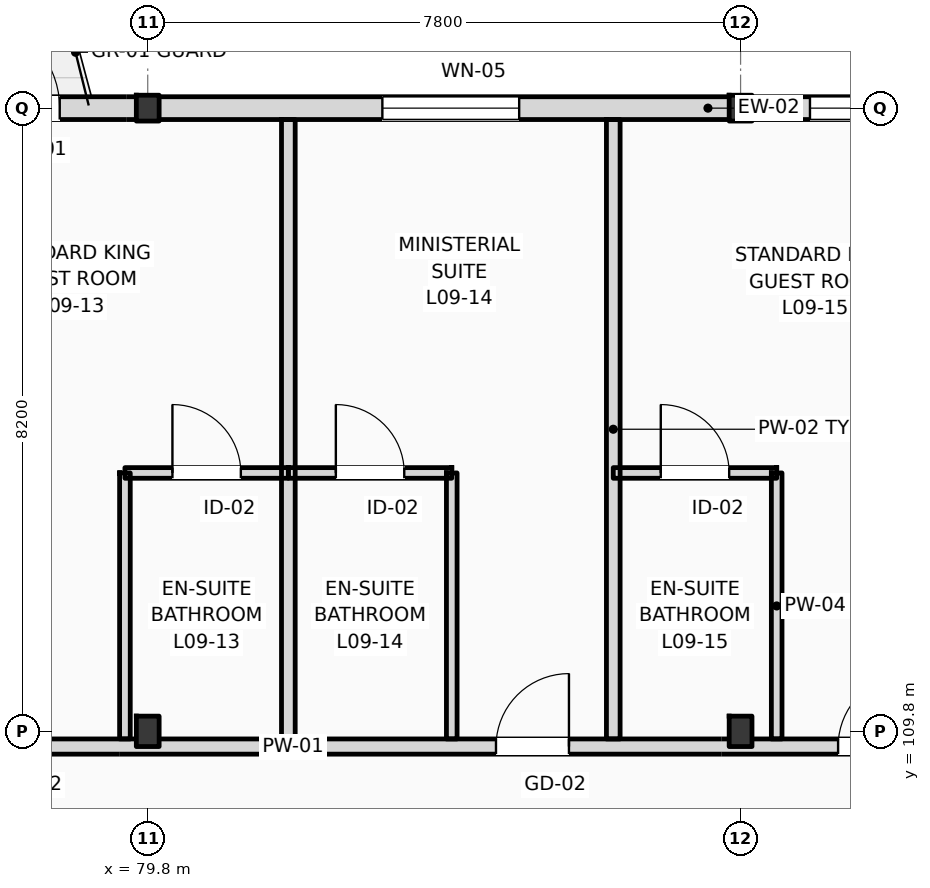
"""IFC4 building model, lengths in metres.
Left out: names, types, materials, properties, quantities, classifications, styles, units other than length and angle.
Written with IfcOpenShell. Run it as: python <this file> out.ifc"""

import sys

from ifc_helpers import new_model, si_unit, direction, frame, frame_2d, origin, origin_2d, place, context, subcontext, project, spatial, rectangle, i_section, extrude, element, fill, save


model = new_model("IFC4")
c1 = context("Model", 3, precision=1e-05, world=origin(), true_north=direction((0.0, 1.0)))
c2 = subcontext(c1, "Body", "Model", "MODEL_VIEW")
j1 = project(units=[si_unit("LENGTHUNIT", "METRE"), si_unit("PLANEANGLEUNIT", "RADIAN")], contexts=[c1])
p1 = place(None, origin())
s1 = spatial("IfcSite", under=j1, at=p1, CompositionType="ELEMENT")
p2 = place(p1, origin())
s2 = spatial("IfcBuilding", under=s1, at=p2, CompositionType="ELEMENT")
p3 = place(p2, frame((0.0, 0.0, 39.0)))
s3 = spatial("IfcBuildingStorey", under=s2, at=p3, CompositionType="ELEMENT", Elevation=39.0)
p4 = place(p3, frame((79.8, 109.8, 0.0), z_axis=(0.0, 0.0, 1.0), x_axis=(1.0, 0.0, 0.0)))
e1 = element("IfcColumn", 1, at=p4, inside=s3, PredefinedType="COLUMN", context=c2, shape_type="SweptSolid", body=[
    extrude(i_section(OverallWidth=0.3, OverallDepth=0.4, WebThickness=0.013, FlangeThickness=0.024, FilletRadius=0.027, at=origin_2d()), origin(), (0.0, 0.0, 1.0), 3.6),
])
p5 = place(p3, frame((79.8, 118.0, 0.0), z_axis=(0.0, 0.0, 1.0), x_axis=(1.0, 0.0, 0.0)))
e2 = element("IfcColumn", 2, at=p5, inside=s3, PredefinedType="COLUMN", context=c2, shape_type="SweptSolid", body=[
    extrude(i_section(OverallWidth=0.3, OverallDepth=0.34, WebThickness=0.012, FlangeThickness=0.021, FilletRadius=0.027, at=origin_2d()), origin(), (0.0, 0.0, 1.0), 3.6),
])
p6 = place(p3, frame((87.6, 109.8, 0.0), z_axis=(0.0, 0.0, 1.0), x_axis=(1.0, 0.0, 0.0)))
e3 = element("IfcColumn", 3, at=p6, inside=s3, PredefinedType="COLUMN", context=c2, shape_type="SweptSolid", body=[
    extrude(i_section(OverallWidth=0.3, OverallDepth=0.4, WebThickness=0.013, FlangeThickness=0.024, FilletRadius=0.027, at=origin_2d()), origin(), (0.0, 0.0, 1.0), 3.6),
])
p7 = place(p3, frame((87.6, 118.0, 0.0), z_axis=(0.0, 0.0, 1.0), x_axis=(1.0, 0.0, 0.0)))
e4 = element("IfcColumn", 4, at=p7, inside=s3, PredefinedType="COLUMN", context=c2, shape_type="SweptSolid", body=[
    extrude(i_section(OverallWidth=0.3, OverallDepth=0.34, WebThickness=0.012, FlangeThickness=0.021, FilletRadius=0.027, at=origin_2d()), origin(), (0.0, 0.0, 1.0), 3.6),
])
p8 = place(p3, frame((22.5, 118.0, 0.0), z_axis=(0.0, 0.0, 1.0), x_axis=(1.0, 0.0, 0.0)))
e5 = element("IfcWall", 5, at=p8, inside=s3, PredefinedType="STANDARD", context=c2, shape_type="SweptSolid", body=[
    extrude(rectangle(XDim=72.9, YDim=0.3, at=frame_2d((36.45, 0.0))), origin(), (0.0, 0.0, 1.0), 2.92),
])
p9 = place(p8, frame((3.6, 0.0, 0.9)))
e6 = element("IfcOpeningElement", 6, at=p9, cuts=e5, PredefinedType="OPENING", context=c2, shape_type="SweptSolid", body=[
    extrude(rectangle(XDim=1.1, YDim=1.6, at=frame_2d((0.55, 0.8))), frame((0.0, 0.16, 0.0), z_axis=(0.0, -1.0, 0.0), x_axis=(1.0, 0.0, 0.0)), (0.0, 0.0, 1.0), 0.32),
])
p10 = place(p8, frame((6.688, 0.0, 0.0)))
e7 = element("IfcOpeningElement", 7, at=p10, cuts=e5, PredefinedType="OPENING", context=c2, shape_type="SweptSolid", body=[
    extrude(rectangle(XDim=1.2, YDim=2.25, at=frame_2d((0.6, 1.125))), frame((0.0, 0.16, 0.0), z_axis=(0.0, -1.0, 0.0), x_axis=(1.0, 0.0, 0.0)), (0.0, 0.0, 1.0), 0.32),
])
p11 = place(p8, frame((11.388, 0.0, 0.9)))
e8 = element("IfcOpeningElement", 8, at=p11, cuts=e5, PredefinedType="OPENING", context=c2, shape_type="SweptSolid", body=[
    extrude(rectangle(XDim=1.6, YDim=1.75, at=frame_2d((0.8, 0.875))), frame((0.0, 0.16, 0.0), z_axis=(0.0, -1.0, 0.0), x_axis=(1.0, 0.0, 0.0)), (0.0, 0.0, 1.0), 0.32),
])
p12 = place(p8, frame((15.413, 0.0, 0.9)))
e9 = element("IfcOpeningElement", 9, at=p12, cuts=e5, PredefinedType="OPENING", context=c2, shape_type="SweptSolid", body=[
    extrude(rectangle(XDim=1.75, YDim=1.84, at=frame_2d((0.875, 0.92))), frame((0.0, 0.16, 0.0), z_axis=(0.0, -1.0, 0.0), x_axis=(1.0, 0.0, 0.0)), (0.0, 0.0, 1.0), 0.32),
])
p13 = place(p8, frame((21.245, 0.0, 0.0)))
e10 = element("IfcOpeningElement", 10, at=p13, cuts=e5, PredefinedType="OPENING", context=c2, shape_type="SweptSolid", body=[
    extrude(rectangle(XDim=1.2, YDim=2.25, at=frame_2d((0.6, 1.125))), frame((0.0, 0.16, 0.0), z_axis=(0.0, -1.0, 0.0), x_axis=(1.0, 0.0, 0.0)), (0.0, 0.0, 1.0), 0.32),
])
p14 = place(p8, frame((23.705, 0.0, 0.0)))
e11 = element("IfcOpeningElement", 11, at=p14, cuts=e5, PredefinedType="OPENING", context=c2, shape_type="SweptSolid", body=[
    extrude(rectangle(XDim=1.2, YDim=2.25, at=frame_2d((0.6, 1.125))), frame((0.0, 0.16, 0.0), z_axis=(0.0, -1.0, 0.0), x_axis=(1.0, 0.0, 0.0)), (0.0, 0.0, 1.0), 0.32),
])
p15 = place(p8, frame((28.488, 0.0, 0.9)))
e12 = element("IfcOpeningElement", 12, at=p15, cuts=e5, PredefinedType="OPENING", context=c2, shape_type="SweptSolid", body=[
    extrude(rectangle(XDim=2.6, YDim=1.84, at=frame_2d((1.3, 0.92))), frame((0.0, 0.16, 0.0), z_axis=(0.0, -1.0, 0.0), x_axis=(1.0, 0.0, 0.0)), (0.0, 0.0, 1.0), 0.32),
])
p16 = place(p8, frame((34.76, 0.0, 0.9)))
e13 = element("IfcOpeningElement", 13, at=p16, cuts=e5, PredefinedType="OPENING", context=c2, shape_type="SweptSolid", body=[
    extrude(rectangle(XDim=1.1, YDim=1.84, at=frame_2d((0.55, 0.92))), frame((0.0, 0.16, 0.0), z_axis=(0.0, -1.0, 0.0), x_axis=(1.0, 0.0, 0.0)), (0.0, 0.0, 1.0), 0.32),
])
p17 = place(p8, frame((38.143, 0.0, 0.0)))
e14 = element("IfcOpeningElement", 14, at=p17, cuts=e5, PredefinedType="OPENING", context=c2, shape_type="SweptSolid", body=[
    extrude(rectangle(XDim=1.2, YDim=2.25, at=frame_2d((0.6, 1.125))), frame((0.0, 0.16, 0.0), z_axis=(0.0, -1.0, 0.0), x_axis=(1.0, 0.0, 0.0)), (0.0, 0.0, 1.0), 0.32),
])
p18 = place(p8, frame((42.687, 0.0, 0.9)))
e15 = element("IfcOpeningElement", 15, at=p18, cuts=e5, PredefinedType="OPENING", context=c2, shape_type="SweptSolid", body=[
    extrude(rectangle(XDim=1.2, YDim=1.8, at=frame_2d((0.6, 0.9))), frame((0.0, 0.16, 0.0), z_axis=(0.0, -1.0, 0.0), x_axis=(1.0, 0.0, 0.0)), (0.0, 0.0, 1.0), 0.32),
])
p19 = place(p8, frame((47.112, 0.0, 0.9)))
e16 = element("IfcOpeningElement", 16, at=p19, cuts=e5, PredefinedType="OPENING", context=c2, shape_type="SweptSolid", body=[
    extrude(rectangle(XDim=1.35, YDim=1.84, at=frame_2d((0.675, 0.92))), frame((0.0, 0.16, 0.0), z_axis=(0.0, -1.0, 0.0), x_axis=(1.0, 0.0, 0.0)), (0.0, 0.0, 1.0), 0.32),
])
p20 = place(p8, frame((52.482, 0.0, 0.0)))
e17 = element("IfcOpeningElement", 17, at=p20, cuts=e5, PredefinedType="OPENING", context=c2, shape_type="SweptSolid", body=[
    extrude(rectangle(XDim=1.2, YDim=2.25, at=frame_2d((0.6, 1.125))), frame((0.0, 0.16, 0.0), z_axis=(0.0, -1.0, 0.0), x_axis=(1.0, 0.0, 0.0)), (0.0, 0.0, 1.0), 0.32),
])
p21 = place(p8, frame((54.942, 0.0, 0.0)))
e18 = element("IfcOpeningElement", 18, at=p21, cuts=e5, PredefinedType="OPENING", context=c2, shape_type="SweptSolid", body=[
    extrude(rectangle(XDim=1.2, YDim=2.25, at=frame_2d((0.6, 1.125))), frame((0.0, 0.16, 0.0), z_axis=(0.0, -1.0, 0.0), x_axis=(1.0, 0.0, 0.0)), (0.0, 0.0, 1.0), 0.32),
])
p22 = place(p8, frame((60.387, 0.0, 0.9)))
e19 = element("IfcOpeningElement", 19, at=p22, cuts=e5, PredefinedType="OPENING", context=c2, shape_type="SweptSolid", body=[
    extrude(rectangle(XDim=1.8, YDim=1.84, at=frame_2d((0.9, 0.92))), frame((0.0, 0.16, 0.0), z_axis=(0.0, -1.0, 0.0), x_axis=(1.0, 0.0, 0.0)), (0.0, 0.0, 1.0), 0.32),
])
p23 = place(p8, frame((66.013, 0.0, 0.9)))
e20 = element("IfcOpeningElement", 20, at=p23, cuts=e5, PredefinedType="OPENING", context=c2, shape_type="SweptSolid", body=[
    extrude(rectangle(XDim=1.35, YDim=1.84, at=frame_2d((0.675, 0.92))), frame((0.0, 0.16, 0.0), z_axis=(0.0, -1.0, 0.0), x_axis=(1.0, 0.0, 0.0)), (0.0, 0.0, 1.0), 0.32),
])
p24 = place(p8, frame((69.275, 0.0, 0.9)))
e21 = element("IfcOpeningElement", 21, at=p24, cuts=e5, PredefinedType="OPENING", context=c2, shape_type="SweptSolid", body=[
    extrude(rectangle(XDim=2.1, YDim=1.84, at=frame_2d((1.05, 0.92))), frame((0.0, 0.16, 0.0), z_axis=(0.0, -1.0, 0.0), x_axis=(1.0, 0.0, 0.0)), (0.0, 0.0, 1.0), 0.32),
])
p25 = place(p3, frame((10.65, 109.6, 0.0), z_axis=(0.0, 0.0, 1.0), x_axis=(1.0, 0.0, 0.0)))
e22 = element("IfcWall", 22, at=p25, inside=s3, PredefinedType="PARTITIONING", context=c2, shape_type="SweptSolid", body=[
    extrude(rectangle(XDim=84.61, YDim=0.2, at=frame_2d((42.305, 0.0))), origin(), (0.0, 0.0, 1.0), 2.82),
])
p26 = place(p25, frame((15.49, 0.0, 0.0)))
e23 = element("IfcOpeningElement", 23, at=p26, cuts=e22, PredefinedType="OPENING", context=c2, shape_type="SweptSolid", body=[
    extrude(rectangle(XDim=1.02, YDim=2.2, at=frame_2d((0.51, 1.1))), frame((0.0, 0.11, 0.0), z_axis=(0.0, -1.0, 0.0), x_axis=(1.0, 0.0, 0.0)), (0.0, 0.0, 1.0), 0.22),
])
p27 = place(p25, frame((19.703, 0.0, 0.0)))
e24 = element("IfcOpeningElement", 24, at=p27, cuts=e22, PredefinedType="OPENING", context=c2, shape_type="SweptSolid", body=[
    extrude(rectangle(XDim=1.02, YDim=2.2, at=frame_2d((0.51, 1.1))), frame((0.0, 0.11, 0.0), z_axis=(0.0, -1.0, 0.0), x_axis=(1.0, 0.0, 0.0)), (0.0, 0.0, 1.0), 0.22),
])
p28 = place(p25, frame((24.203, 0.0, 0.0)))
e25 = element("IfcOpeningElement", 25, at=p28, cuts=e22, PredefinedType="OPENING", context=c2, shape_type="SweptSolid", body=[
    extrude(rectangle(XDim=1.02, YDim=2.2, at=frame_2d((0.51, 1.1))), frame((0.0, 0.11, 0.0), z_axis=(0.0, -1.0, 0.0), x_axis=(1.0, 0.0, 0.0)), (0.0, 0.0, 1.0), 0.22),
])
p29 = place(p25, frame((26.552, 0.0, 0.0)))
e26 = element("IfcOpeningElement", 26, at=p29, cuts=e22, PredefinedType="OPENING", context=c2, shape_type="SweptSolid", body=[
    extrude(rectangle(XDim=1.02, YDim=2.2, at=frame_2d((0.51, 1.1))), frame((0.0, 0.11, 0.0), z_axis=(0.0, -1.0, 0.0), x_axis=(1.0, 0.0, 0.0)), (0.0, 0.0, 1.0), 0.22),
])
p30 = place(p25, frame((33.233, 0.0, 0.0)))
e27 = element("IfcOpeningElement", 27, at=p30, cuts=e22, PredefinedType="OPENING", context=c2, shape_type="SweptSolid", body=[
    extrude(rectangle(XDim=0.96, YDim=2.2, at=frame_2d((0.48, 1.1))), frame((0.0, 0.11, 0.0), z_axis=(0.0, -1.0, 0.0), x_axis=(1.0, 0.0, 0.0)), (0.0, 0.0, 1.0), 0.22),
])
p31 = place(p25, frame((35.583, 0.0, 0.0)))
e28 = element("IfcOpeningElement", 28, at=p31, cuts=e22, PredefinedType="OPENING", context=c2, shape_type="SweptSolid", body=[
    extrude(rectangle(XDim=0.96, YDim=2.2, at=frame_2d((0.48, 1.1))), frame((0.0, 0.11, 0.0), z_axis=(0.0, -1.0, 0.0), x_axis=(1.0, 0.0, 0.0)), (0.0, 0.0, 1.0), 0.22),
])
p32 = place(p25, frame((42.233, 0.0, 0.0)))
e29 = element("IfcOpeningElement", 29, at=p32, cuts=e22, PredefinedType="OPENING", context=c2, shape_type="SweptSolid", body=[
    extrude(rectangle(XDim=0.96, YDim=2.2, at=frame_2d((0.48, 1.1))), frame((0.0, 0.11, 0.0), z_axis=(0.0, -1.0, 0.0), x_axis=(1.0, 0.0, 0.0)), (0.0, 0.0, 1.0), 0.22),
])
p33 = place(p25, frame((46.983, 0.0, 0.0)))
e30 = element("IfcOpeningElement", 30, at=p33, cuts=e22, PredefinedType="OPENING", context=c2, shape_type="SweptSolid", body=[
    extrude(rectangle(XDim=0.96, YDim=2.2, at=frame_2d((0.48, 1.1))), frame((0.0, 0.11, 0.0), z_axis=(0.0, -1.0, 0.0), x_axis=(1.0, 0.0, 0.0)), (0.0, 0.0, 1.0), 0.22),
])
p34 = place(p25, frame((51.233, 0.0, 0.0)))
e31 = element("IfcOpeningElement", 31, at=p34, cuts=e22, PredefinedType="OPENING", context=c2, shape_type="SweptSolid", body=[
    extrude(rectangle(XDim=0.96, YDim=2.2, at=frame_2d((0.48, 1.1))), frame((0.0, 0.11, 0.0), z_axis=(0.0, -1.0, 0.0), x_axis=(1.0, 0.0, 0.0)), (0.0, 0.0, 1.0), 0.22),
])
p35 = place(p25, frame((55.733, 0.0, 0.0)))
e32 = element("IfcOpeningElement", 32, at=p35, cuts=e22, PredefinedType="OPENING", context=c2, shape_type="SweptSolid", body=[
    extrude(rectangle(XDim=0.96, YDim=2.2, at=frame_2d((0.48, 1.1))), frame((0.0, 0.11, 0.0), z_axis=(0.0, -1.0, 0.0), x_axis=(1.0, 0.0, 0.0)), (0.0, 0.0, 1.0), 0.22),
])
p36 = place(p25, frame((58.083, 0.0, 0.0)))
e33 = element("IfcOpeningElement", 33, at=p36, cuts=e22, PredefinedType="OPENING", context=c2, shape_type="SweptSolid", body=[
    extrude(rectangle(XDim=0.96, YDim=2.2, at=frame_2d((0.48, 1.1))), frame((0.0, 0.11, 0.0), z_axis=(0.0, -1.0, 0.0), x_axis=(1.0, 0.0, 0.0)), (0.0, 0.0, 1.0), 0.22),
])
p37 = place(p25, frame((64.732, 0.0, 0.0)))
e34 = element("IfcOpeningElement", 34, at=p37, cuts=e22, PredefinedType="OPENING", context=c2, shape_type="SweptSolid", body=[
    extrude(rectangle(XDim=0.96, YDim=2.2, at=frame_2d((0.48, 1.1))), frame((0.0, 0.11, 0.0), z_axis=(0.0, -1.0, 0.0), x_axis=(1.0, 0.0, 0.0)), (0.0, 0.0, 1.0), 0.22),
])
p38 = place(p25, frame((66.832, 0.0, 0.0)))
e35 = element("IfcOpeningElement", 35, at=p38, cuts=e22, PredefinedType="OPENING", context=c2, shape_type="SweptSolid", body=[
    extrude(rectangle(XDim=0.96, YDim=2.2, at=frame_2d((0.48, 1.1))), frame((0.0, 0.11, 0.0), z_axis=(0.0, -1.0, 0.0), x_axis=(1.0, 0.0, 0.0)), (0.0, 0.0, 1.0), 0.22),
])
p39 = place(p25, frame((73.732, 0.0, 0.0)))
e36 = element("IfcOpeningElement", 36, at=p39, cuts=e22, PredefinedType="OPENING", context=c2, shape_type="SweptSolid", body=[
    extrude(rectangle(XDim=0.96, YDim=2.2, at=frame_2d((0.48, 1.1))), frame((0.0, 0.11, 0.0), z_axis=(0.0, -1.0, 0.0), x_axis=(1.0, 0.0, 0.0)), (0.0, 0.0, 1.0), 0.22),
])
p40 = place(p25, frame((78.233, 0.0, 0.0)))
e37 = element("IfcOpeningElement", 37, at=p40, cuts=e22, PredefinedType="OPENING", context=c2, shape_type="SweptSolid", body=[
    extrude(rectangle(XDim=0.96, YDim=2.2, at=frame_2d((0.48, 1.1))), frame((0.0, 0.11, 0.0), z_axis=(0.0, -1.0, 0.0), x_axis=(1.0, 0.0, 0.0)), (0.0, 0.0, 1.0), 0.22),
])
p41 = place(p25, frame((80.62, 0.0, 0.0)))
e38 = element("IfcOpeningElement", 38, at=p41, cuts=e22, PredefinedType="OPENING", context=c2, shape_type="SweptSolid", body=[
    extrude(rectangle(XDim=0.96, YDim=2.2, at=frame_2d((0.48, 1.1))), frame((0.0, 0.11, 0.0), z_axis=(0.0, -1.0, 0.0), x_axis=(1.0, 0.0, 0.0)), (0.0, 0.0, 1.0), 0.22),
])
p42 = place(p25, frame((2.716, 0.0, 0.0)))
e39 = element("IfcOpeningElement", 39, at=p42, cuts=e22, PredefinedType="OPENING", context=c2, shape_type="SweptSolid", body=[
    extrude(rectangle(XDim=1.35, YDim=2.25, at=frame_2d((0.675, 1.125))), frame((0.0, 0.11, 0.0), z_axis=(0.0, -1.0, 0.0), x_axis=(1.0, 0.0, 0.0)), (0.0, 0.0, 1.0), 0.22),
])
p43 = place(p25, frame((6.65, 0.0, 0.0)))
e40 = element("IfcOpeningElement", 40, at=p43, cuts=e22, PredefinedType="OPENING", context=c2, shape_type="SweptSolid", body=[
    extrude(rectangle(XDim=1.35, YDim=2.25, at=frame_2d((0.675, 1.125))), frame((0.0, 0.11, 0.0), z_axis=(0.0, -1.0, 0.0), x_axis=(1.0, 0.0, 0.0)), (0.0, 0.0, 1.0), 0.22),
])
p44 = place(p25, frame((10.583, 0.0, 0.0)))
e41 = element("IfcOpeningElement", 41, at=p44, cuts=e22, PredefinedType="OPENING", context=c2, shape_type="SweptSolid", body=[
    extrude(rectangle(XDim=1.35, YDim=2.25, at=frame_2d((0.675, 1.125))), frame((0.0, 0.11, 0.0), z_axis=(0.0, -1.0, 0.0), x_axis=(1.0, 0.0, 0.0)), (0.0, 0.0, 1.0), 0.22),
])
p45 = place(p3, frame((81.65, 109.7, 0.0), z_axis=(0.0, 0.0, 1.0), x_axis=(0.0, 1.0, 0.0)))
e42 = element("IfcWall", 42, at=p45, inside=s3, PredefinedType="PARTITIONING", context=c2, shape_type="SweptSolid", body=[
    extrude(rectangle(XDim=8.15, YDim=0.18, at=frame_2d((4.075, 0.0))), origin(), (0.0, 0.0, 1.0), 3.38),
])
p46 = place(p3, frame((79.5, 109.7, 0.0), z_axis=(0.0, 0.0, 1.0), x_axis=(0.0, 1.0, 0.0)))
e43 = element("IfcWall", 43, at=p46, inside=s3, PredefinedType="PARTITIONING", context=c2, shape_type="SweptSolid", body=[
    extrude(rectangle(XDim=3.5, YDim=0.14, at=frame_2d((1.75, 0.0))), origin(), (0.0, 0.0, 1.0), 3.38),
])
p47 = place(p3, frame((79.5, 113.2, 0.0), z_axis=(0.0, 0.0, 1.0), x_axis=(1.0, 0.0, 0.0)))
e44 = element("IfcWall", 44, at=p47, inside=s3, PredefinedType="PARTITIONING", context=c2, shape_type="SweptSolid", body=[
    extrude(rectangle(XDim=2.15, YDim=0.14, at=frame_2d((1.075, 0.0))), origin(), (0.0, 0.0, 1.0), 3.38),
])
p48 = place(p47, frame((0.625, 0.0, 0.0)))
e45 = element("IfcOpeningElement", 45, at=p48, cuts=e44, PredefinedType="OPENING", context=c2, shape_type="SweptSolid", body=[
    extrude(rectangle(XDim=0.9, YDim=2.1, at=frame_2d((0.45, 1.05))), frame((0.0, 0.08, 0.0), z_axis=(0.0, -1.0, 0.0), x_axis=(1.0, 0.0, 0.0)), (0.0, 0.0, 1.0), 0.16),
])
p49 = place(p3, frame((85.925, 109.7, 0.0), z_axis=(0.0, 0.0, 1.0), x_axis=(0.0, 1.0, 0.0)))
e46 = element("IfcWall", 46, at=p49, inside=s3, PredefinedType="PARTITIONING", context=c2, shape_type="SweptSolid", body=[
    extrude(rectangle(XDim=8.15, YDim=0.18, at=frame_2d((4.075, 0.0))), origin(), (0.0, 0.0, 1.0), 3.38),
])
p50 = place(p3, frame((83.8, 109.7, 0.0), z_axis=(0.0, 0.0, 1.0), x_axis=(0.0, 1.0, 0.0)))
e47 = element("IfcWall", 47, at=p50, inside=s3, PredefinedType="PARTITIONING", context=c2, shape_type="SweptSolid", body=[
    extrude(rectangle(XDim=3.5, YDim=0.14, at=frame_2d((1.75, 0.0))), origin(), (0.0, 0.0, 1.0), 3.38),
])
p51 = place(p3, frame((81.65, 113.2, 0.0), z_axis=(0.0, 0.0, 1.0), x_axis=(1.0, 0.0, 0.0)))
e48 = element("IfcWall", 48, at=p51, inside=s3, PredefinedType="PARTITIONING", context=c2, shape_type="SweptSolid", body=[
    extrude(rectangle(XDim=2.15, YDim=0.14, at=frame_2d((1.075, 0.0))), origin(), (0.0, 0.0, 1.0), 3.38),
])
p52 = place(p51, frame((0.625, 0.0, 0.0)))
e49 = element("IfcOpeningElement", 49, at=p52, cuts=e48, PredefinedType="OPENING", context=c2, shape_type="SweptSolid", body=[
    extrude(rectangle(XDim=0.9, YDim=2.1, at=frame_2d((0.45, 1.05))), frame((0.0, 0.08, 0.0), z_axis=(0.0, -1.0, 0.0), x_axis=(1.0, 0.0, 0.0)), (0.0, 0.0, 1.0), 0.16),
])
p53 = place(p3, frame((88.075, 109.7, 0.0), z_axis=(0.0, 0.0, 1.0), x_axis=(0.0, 1.0, 0.0)))
e50 = element("IfcWall", 50, at=p53, inside=s3, PredefinedType="PARTITIONING", context=c2, shape_type="SweptSolid", body=[
    extrude(rectangle(XDim=3.5, YDim=0.14, at=frame_2d((1.75, 0.0))), origin(), (0.0, 0.0, 1.0), 3.38),
])
p54 = place(p3, frame((85.925, 113.2, 0.0), z_axis=(0.0, 0.0, 1.0), x_axis=(1.0, 0.0, 0.0)))
e51 = element("IfcWall", 51, at=p54, inside=s3, PredefinedType="PARTITIONING", context=c2, shape_type="SweptSolid", body=[
    extrude(rectangle(XDim=2.15, YDim=0.14, at=frame_2d((1.075, 0.0))), origin(), (0.0, 0.0, 1.0), 3.38),
])
p55 = place(p54, frame((0.625, 0.0, 0.0)))
e52 = element("IfcOpeningElement", 52, at=p55, cuts=e51, PredefinedType="OPENING", context=c2, shape_type="SweptSolid", body=[
    extrude(rectangle(XDim=0.9, YDim=2.1, at=frame_2d((0.45, 1.05))), frame((0.0, 0.08, 0.0), z_axis=(0.0, -1.0, 0.0), x_axis=(1.0, 0.0, 0.0)), (0.0, 0.0, 1.0), 0.16),
])
p56 = place(p21, origin())
e53 = element("IfcDoor", 53, at=p56, inside=s3, OperationType="SINGLE_SWING_LEFT", PredefinedType="DOOR", context=c2, shape_type="SweptSolid", body=[
    extrude(rectangle(XDim=1.2, YDim=2.25, at=frame_2d((0.6, 1.125))), frame((0.0, 0.025, 0.0), z_axis=(0.0, -1.0, 0.0), x_axis=(1.0, 0.0, 0.0)), (0.0, 0.0, 1.0), 0.05),
])
fill(e18, e53)
p57 = place(p22, origin())
e54 = element("IfcWindow", 54, at=p57, inside=s3, PartitioningType="DOUBLE_PANEL_VERTICAL", PredefinedType="WINDOW", context=c2, shape_type="SweptSolid", body=[
    extrude(rectangle(XDim=1.8, YDim=1.84, at=frame_2d((0.9, 0.92))), frame((0.0, 0.03, 0.0), z_axis=(0.0, -1.0, 0.0), x_axis=(1.0, 0.0, 0.0)), (0.0, 0.0, 1.0), 0.06),
])
fill(e19, e54)
p58 = place(p23, origin())
e55 = element("IfcWindow", 55, at=p58, inside=s3, PartitioningType="DOUBLE_PANEL_VERTICAL", PredefinedType="WINDOW", context=c2, shape_type="SweptSolid", body=[
    extrude(rectangle(XDim=1.35, YDim=1.84, at=frame_2d((0.675, 0.92))), frame((0.0, 0.03, 0.0), z_axis=(0.0, -1.0, 0.0), x_axis=(1.0, 0.0, 0.0)), (0.0, 0.0, 1.0), 0.06),
])
fill(e20, e55)
p59 = place(p48, origin())
e56 = element("IfcDoor", 56, at=p59, inside=s3, OperationType="SINGLE_SWING_LEFT", PredefinedType="DOOR", context=c2, shape_type="SweptSolid", body=[
    extrude(rectangle(XDim=0.9, YDim=2.1, at=frame_2d((0.45, 1.05))), frame((0.0, 0.025, 0.0), z_axis=(0.0, -1.0, 0.0), x_axis=(1.0, 0.0, 0.0)), (0.0, 0.0, 1.0), 0.05),
])
fill(e45, e56)
p60 = place(p39, origin())
e57 = element("IfcDoor", 57, at=p60, inside=s3, OperationType="SINGLE_SWING_RIGHT", PredefinedType="DOOR", context=c2, shape_type="SweptSolid", body=[
    extrude(rectangle(XDim=0.96, YDim=2.2, at=frame_2d((0.48, 1.1))), frame((0.0, 0.025, 0.0), z_axis=(0.0, -1.0, 0.0), x_axis=(1.0, 0.0, 0.0)), (0.0, 0.0, 1.0), 0.05),
])
fill(e36, e57)
p61 = place(p52, origin())
e58 = element("IfcDoor", 58, at=p61, inside=s3, OperationType="SINGLE_SWING_LEFT", PredefinedType="DOOR", context=c2, shape_type="SweptSolid", body=[
    extrude(rectangle(XDim=0.9, YDim=2.1, at=frame_2d((0.45, 1.05))), frame((0.0, 0.025, 0.0), z_axis=(0.0, -1.0, 0.0), x_axis=(1.0, 0.0, 0.0)), (0.0, 0.0, 1.0), 0.05),
])
fill(e49, e58)
p62 = place(p40, origin())
e59 = element("IfcDoor", 59, at=p62, inside=s3, OperationType="SINGLE_SWING_RIGHT", PredefinedType="DOOR", context=c2, shape_type="SweptSolid", body=[
    extrude(rectangle(XDim=0.96, YDim=2.2, at=frame_2d((0.48, 1.1))), frame((0.0, 0.025, 0.0), z_axis=(0.0, -1.0, 0.0), x_axis=(1.0, 0.0, 0.0)), (0.0, 0.0, 1.0), 0.05),
])
fill(e37, e59)
p63 = place(p55, origin())
e60 = element("IfcDoor", 60, at=p63, inside=s3, OperationType="SINGLE_SWING_LEFT", PredefinedType="DOOR", context=c2, shape_type="SweptSolid", body=[
    extrude(rectangle(XDim=0.9, YDim=2.1, at=frame_2d((0.45, 1.05))), frame((0.0, 0.025, 0.0), z_axis=(0.0, -1.0, 0.0), x_axis=(1.0, 0.0, 0.0)), (0.0, 0.0, 1.0), 0.05),
])
fill(e52, e60)
save(model, sys.argv[1])
